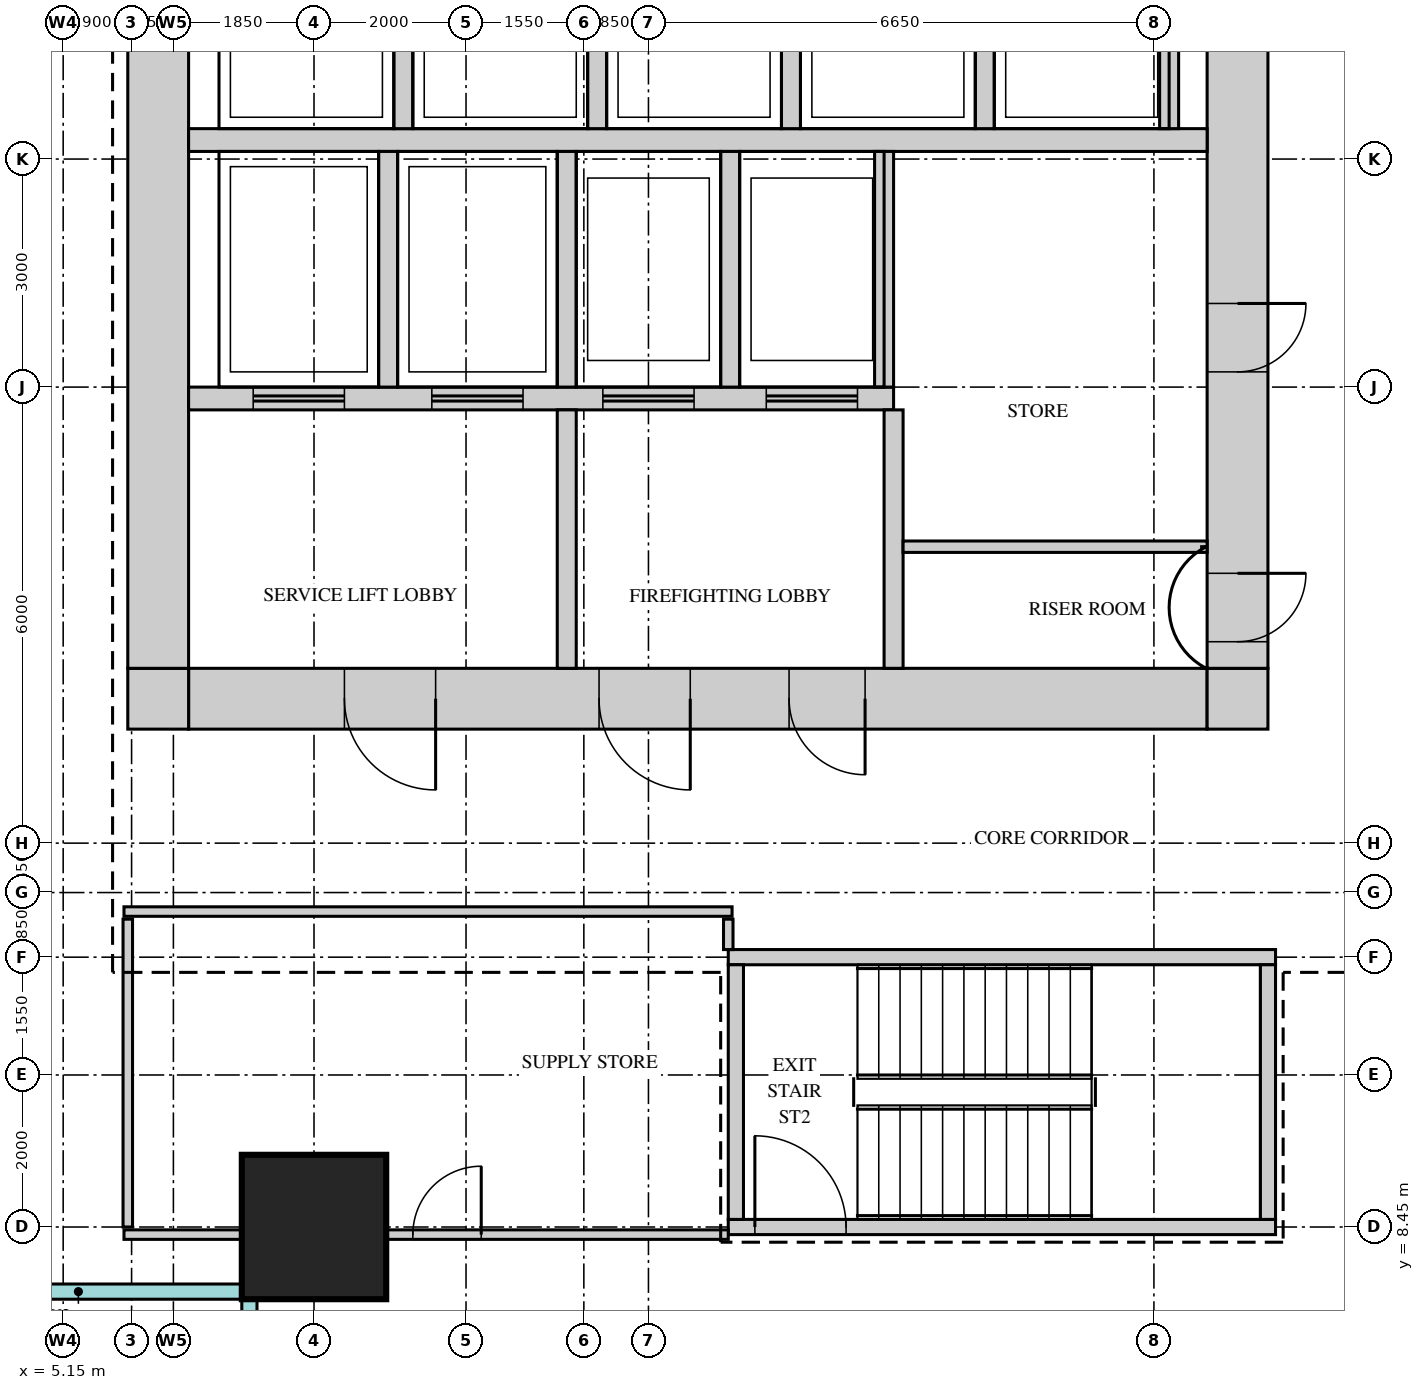
"""IFC4 building model, lengths in metres.
Left out: names, types, materials, properties, quantities, classifications, styles, units other than length and angle.
Written with IfcOpenShell. Run it as: python <this file> out.ifc"""

import sys

from ifc_helpers import new_model, si_unit, direction, frame, frame_2d, origin, origin_2d, place, context, subcontext, project, spatial, rectangle, extrude, source, transform, mapped, element, fill, save


model = new_model("IFC4")
c1 = context("Model", 3, precision=1e-05, world=origin(), true_north=direction((0.0, 1.0)))
c2 = subcontext(c1, "Body", "Model", "MODEL_VIEW")
j1 = project(units=[si_unit("LENGTHUNIT", "METRE"), si_unit("PLANEANGLEUNIT", "RADIAN")], contexts=[c1])
p1 = place(None, origin())
s1 = spatial("IfcSite", under=j1, at=p1, CompositionType="ELEMENT")
p2 = place(p1, origin())
s2 = spatial("IfcBuilding", under=s1, at=p2, CompositionType="ELEMENT")
p3 = place(p2, frame((0.0, 0.0, 208.7)))
s3 = spatial("IfcBuildingStorey", under=s2, at=p3, CompositionType="ELEMENT", Elevation=208.7)
m1 = source(origin(), c2, "Body", "SweptSolid", [
    extrude(rectangle(XDim=13.4, YDim=0.8, at=frame_2d((6.7, 0.0))), origin(), (0.0, 0.0, 1.0), 3.75),
])
p4 = place(p3, frame((6.8, 15.4, 0.0), z_axis=(0.0, 0.0, 1.0), x_axis=(1.0, 0.0, 0.0)))
e1 = element("IfcWall", 1, at=p4, inside=s3, PredefinedType="SHEAR", context=c2, shape_type="MappedRepresentation", body=[
    mapped(m1, transform((0.0, 0.0, 0.0))),
])
m2 = source(origin(), c2, "Body", "SweptSolid", [
    extrude(rectangle(XDim=1.2, YDim=2.1, at=frame_2d((0.6, 1.05))), frame((0.0, 0.41, 0.0), z_axis=(0.0, -1.0, 0.0), x_axis=(1.0, 0.0, 0.0)), (0.0, 0.0, 1.0), 0.82),
])
p5 = place(p4, frame((5.4, 0.0, 0.0)))
e2 = element("IfcOpeningElement", 2, at=p5, cuts=e1, PredefinedType="OPENING", context=c2, shape_type="MappedRepresentation", body=[
    mapped(m2, transform((0.0, 0.0, 0.0))),
])
p6 = place(p4, frame((2.05, 0.0, 0.0)))
e3 = element("IfcOpeningElement", 3, at=p6, cuts=e1, PredefinedType="OPENING", context=c2, shape_type="MappedRepresentation", body=[
    mapped(m2, transform((0.0, 0.0, 0.0))),
])
m3 = source(origin(), c2, "Body", "SweptSolid", [
    extrude(rectangle(XDim=1.0, YDim=2.1, at=frame_2d((0.5, 1.05))), frame((0.0, 0.41, 0.0), z_axis=(0.0, -1.0, 0.0), x_axis=(1.0, 0.0, 0.0)), (0.0, 0.0, 1.0), 0.82),
])
p7 = place(p4, frame((7.9, 0.0, 0.0)))
e4 = element("IfcOpeningElement", 4, at=p7, cuts=e1, PredefinedType="OPENING", context=c2, shape_type="MappedRepresentation", body=[
    mapped(m3, transform((0.0, 0.0, 0.0))),
])
m4 = source(origin(), c2, "Body", "SweptSolid", [
    extrude(rectangle(XDim=0.8, YDim=0.8, at=frame_2d((0.4, 0.0))), origin(), (0.0, 0.0, 1.0), 3.75),
])
for number, where, z_axis, x_axis in (
    (5, (20.2, 15.4, 0.0), (0.0, 0.0, 1.0), (1.0, 0.0, 0.0)),
    (6, (6.0, 15.4, 0.0), (0.0, 0.0, 1.0), (1.0, 0.0, 0.0)),
):
    element("IfcWall", number, at=place(p3, frame(where, z_axis=z_axis, x_axis=x_axis)), inside=s3, PredefinedType="SHEAR", context=c2, shape_type="MappedRepresentation", body=[
        mapped(m4, transform((0.0, 0.0, 0.0))),
    ])
m5 = source(origin(), c2, "Body", "SweptSolid", [
    extrude(rectangle(XDim=22.4, YDim=0.8, at=frame_2d((11.2, 0.0))), origin(), (0.0, 0.0, 1.0), 3.75),
])
p8 = place(p3, frame((20.6, 15.8, 0.0), z_axis=(0.0, 0.0, 1.0), x_axis=(0.0, 1.0, 0.0)))
e7 = element("IfcWall", 7, at=p8, inside=s3, PredefinedType="SHEAR", context=c2, shape_type="MappedRepresentation", body=[
    mapped(m5, transform((0.0, 0.0, 0.0))),
])
m6 = source(origin(), c2, "Body", "SweptSolid", [
    extrude(rectangle(XDim=1.8, YDim=2.1, at=frame_2d((0.9, 1.05))), frame((0.0, 0.41, 0.0), z_axis=(0.0, -1.0, 0.0), x_axis=(1.0, 0.0, 0.0)), (0.0, 0.0, 1.0), 0.82),
])
p9 = place(p8, frame((10.7, 0.0, 0.0)))
e8 = element("IfcOpeningElement", 8, at=p9, cuts=e7, PredefinedType="OPENING", context=c2, shape_type="MappedRepresentation", body=[
    mapped(m6, transform((0.0, 0.0, 0.0))),
])
m7 = source(origin(), c2, "Body", "SweptSolid", [
    extrude(rectangle(XDim=0.9, YDim=2.1, at=frame_2d((0.45, 1.05))), frame((0.0, 0.41, 0.0), z_axis=(0.0, -1.0, 0.0), x_axis=(1.0, 0.0, 0.0)), (0.0, 0.0, 1.0), 0.82),
])
p10 = place(p8, frame((0.35, 0.0, 0.0)))
e9 = element("IfcOpeningElement", 9, at=p10, cuts=e7, PredefinedType="OPENING", context=c2, shape_type="MappedRepresentation", body=[
    mapped(m7, transform((0.0, 0.0, 0.0))),
])
p11 = place(p8, frame((3.9, 0.0, 0.0)))
e10 = element("IfcOpeningElement", 10, at=p11, cuts=e7, PredefinedType="OPENING", context=c2, shape_type="MappedRepresentation", body=[
    mapped(m7, transform((0.0, 0.0, 0.0))),
])
p12 = place(p3, frame((6.4, 15.8, 0.0), z_axis=(0.0, 0.0, 1.0), x_axis=(0.0, 1.0, 0.0)))
e11 = element("IfcWall", 11, at=p12, inside=s3, PredefinedType="SHEAR", context=c2, shape_type="MappedRepresentation", body=[
    mapped(m5, transform((0.0, 0.0, 0.0))),
])
m8 = source(origin(), c2, "Body", "SweptSolid", [
    extrude(rectangle(XDim=7.2, YDim=0.2, at=frame_2d((3.6, 0.0))), origin(), (0.0, 0.0, 1.0), 3.75),
])
p13 = place(p3, frame((13.9, 12.0, 0.0), z_axis=(0.0, 0.0, 1.0), x_axis=(1.0, 0.0, 0.0)))
e12 = element("IfcWall", 12, at=p13, inside=s3, PredefinedType="SHEAR", context=c2, shape_type="MappedRepresentation", body=[
    mapped(m8, transform((0.0, 0.0, 0.0))),
])
p14 = place(p3, frame((13.9, 8.45, 0.0), z_axis=(0.0, 0.0, 1.0), x_axis=(1.0, 0.0, 0.0)))
e13 = element("IfcWall", 13, at=p14, inside=s3, PredefinedType="SHEAR", context=c2, shape_type="MappedRepresentation", body=[
    mapped(m8, transform((0.0, 0.0, 0.0))),
])
m9 = source(origin(), c2, "Body", "SweptSolid", [
    extrude(rectangle(XDim=1.2, YDim=2.1, at=frame_2d((0.6, 1.05))), frame((0.0, 0.11, 0.0), z_axis=(0.0, -1.0, 0.0), x_axis=(1.0, 0.0, 0.0)), (0.0, 0.0, 1.0), 0.22),
])
p15 = place(p14, frame((0.35, 0.0, 0.0)))
e14 = element("IfcOpeningElement", 14, at=p15, cuts=e13, PredefinedType="OPENING", context=c2, shape_type="MappedRepresentation", body=[
    mapped(m9, transform((0.0, 0.0, 0.0))),
])
m10 = source(origin(), c2, "Body", "SweptSolid", [
    extrude(rectangle(XDim=3.35, YDim=0.2, at=frame_2d((1.675, 0.0))), origin(), (0.0, 0.0, 1.0), 3.75),
])
for number, where, z_axis, x_axis in (
    (15, (21.0, 8.55, 0.0), (0.0, 0.0, 1.0), (0.0, 1.0, 0.0)),
    (16, (14.0, 8.55, 0.0), (0.0, 0.0, 1.0), (0.0, 1.0, 0.0)),
):
    element("IfcWall", number, at=place(p3, frame(where, z_axis=z_axis, x_axis=x_axis)), inside=s3, PredefinedType="SHEAR", context=c2, shape_type="MappedRepresentation", body=[
        mapped(m10, transform((0.0, 0.0, 0.0))),
    ])
m11 = source(origin(), c2, "Body", "SweptSolid", [
    extrude(rectangle(XDim=13.4, YDim=0.3, at=frame_2d((6.7, 0.0))), origin(), (0.0, 0.0, 1.0), 3.75),
])
p16 = place(p3, frame((6.8, 22.75, 0.0), z_axis=(0.0, 0.0, 1.0), x_axis=(1.0, 0.0, 0.0)))
e17 = element("IfcWall", 17, at=p16, inside=s3, PredefinedType="STANDARD", context=c2, shape_type="MappedRepresentation", body=[
    mapped(m11, transform((0.0, 0.0, 0.0))),
])
m12 = source(origin(), c2, "Body", "SweptSolid", [
    extrude(rectangle(XDim=9.275, YDim=0.3, at=frame_2d((4.637, 0.0))), origin(), (0.0, 0.0, 1.0), 3.75),
])
p17 = place(p3, frame((6.8, 19.35, 0.0), z_axis=(0.0, 0.0, 1.0), x_axis=(1.0, 0.0, 0.0)))
e18 = element("IfcWall", 18, at=p17, inside=s3, PredefinedType="STANDARD", context=c2, shape_type="MappedRepresentation", body=[
    mapped(m12, transform((0.0, 0.0, 0.0))),
])
m13 = source(origin(), c2, "Body", "SweptSolid", [
    extrude(rectangle(XDim=1.2, YDim=2.1, at=frame_2d((0.6, 1.05))), frame((0.0, 0.16, 0.0), z_axis=(0.0, -1.0, 0.0), x_axis=(1.0, 0.0, 0.0)), (0.0, 0.0, 1.0), 0.32),
])
p18 = place(p17, frame((0.85, 0.0, 0.0)))
e19 = element("IfcOpeningElement", 19, at=p18, cuts=e18, PredefinedType="OPENING", context=c2, shape_type="MappedRepresentation", body=[
    mapped(m13, transform((0.0, 0.0, 0.0))),
])
p19 = place(p17, frame((3.2, 0.0, 0.0)))
e20 = element("IfcOpeningElement", 20, at=p19, cuts=e18, PredefinedType="OPENING", context=c2, shape_type="MappedRepresentation", body=[
    mapped(m13, transform((0.0, 0.0, 0.0))),
])
p20 = place(p17, frame((5.45, 0.0, 0.0)))
e21 = element("IfcOpeningElement", 21, at=p20, cuts=e18, PredefinedType="OPENING", context=c2, shape_type="MappedRepresentation", body=[
    mapped(m13, transform((0.0, 0.0, 0.0))),
])
p21 = place(p17, frame((7.6, 0.0, 0.0)))
e22 = element("IfcOpeningElement", 22, at=p21, cuts=e18, PredefinedType="OPENING", context=c2, shape_type="MappedRepresentation", body=[
    mapped(m13, transform((0.0, 0.0, 0.0))),
])
m14 = source(origin(), c2, "Body", "SweptSolid", [
    extrude(rectangle(XDim=3.1, YDim=0.25, at=frame_2d((1.55, 0.0))), origin(), (0.0, 0.0, 1.0), 3.75),
])
for number, where, z_axis, x_axis in (
    (23, (9.425, 19.5, 0.0), (0.0, 0.0, 1.0), (0.0, 1.0, 0.0)),
    (24, (11.775, 19.5, 0.0), (0.0, 0.0, 1.0), (0.0, 1.0, 0.0)),
    (25, (13.925, 19.5, 0.0), (0.0, 0.0, 1.0), (0.0, 1.0, 0.0)),
    (26, (15.95, 19.5, 0.0), (0.0, 0.0, 1.0), (0.0, 1.0, 0.0)),
):
    element("IfcWall", number, at=place(p3, frame(where, z_axis=z_axis, x_axis=x_axis)), inside=s3, PredefinedType="STANDARD", context=c2, shape_type="MappedRepresentation", body=[
        mapped(m14, transform((0.0, 0.0, 0.0))),
    ])
m15 = source(origin(), c2, "Body", "SweptSolid", [
    extrude(rectangle(XDim=2.4, YDim=0.25, at=frame_2d((1.2, 0.0))), origin(), (0.0, 0.0, 1.0), 3.75),
])
for number, where, z_axis, x_axis in (
    (27, (17.275, 22.9, 0.0), (0.0, 0.0, 1.0), (0.0, 1.0, 0.0)),
    (28, (19.7, 22.9, 0.0), (0.0, 0.0, 1.0), (0.0, 1.0, 0.0)),
    (29, (9.625, 22.9, 0.0), (0.0, 0.0, 1.0), (0.0, 1.0, 0.0)),
    (30, (12.175, 22.9, 0.0), (0.0, 0.0, 1.0), (0.0, 1.0, 0.0)),
    (31, (14.725, 22.9, 0.0), (0.0, 0.0, 1.0), (0.0, 1.0, 0.0)),
):
    element("IfcWall", number, at=place(p3, frame(where, z_axis=z_axis, x_axis=x_axis)), inside=s3, PredefinedType="STANDARD", context=c2, shape_type="MappedRepresentation", body=[
        mapped(m15, transform((0.0, 0.0, 0.0))),
    ])
m16 = source(origin(), c2, "Body", "SweptSolid", [
    extrude(rectangle(XDim=3.4, YDim=0.25, at=frame_2d((1.7, 0.0))), origin(), (0.0, 0.0, 1.0), 3.75),
])
for number, where, z_axis, x_axis in (
    (32, (16.075, 15.8, 0.0), (0.0, 0.0, 1.0), (0.0, 1.0, 0.0)),
    (33, (11.775, 15.8, 0.0), (0.0, 0.0, 1.0), (0.0, 1.0, 0.0)),
):
    element("IfcWall", number, at=place(p3, frame(where, z_axis=z_axis, x_axis=x_axis)), inside=s3, PredefinedType="STANDARD", context=c2, shape_type="MappedRepresentation", body=[
        mapped(m16, transform((0.0, 0.0, 0.0))),
    ])
m17 = source(origin(), c2, "Body", "SweptSolid", [
    extrude(rectangle(XDim=1.9, YDim=1.9, at=origin_2d()), origin(), (0.0, 0.0, 1.0), 4.0),
])
p22 = place(p3, frame((8.45, 8.45, 0.0), z_axis=(0.0, 0.0, 1.0), x_axis=(1.0, 0.0, 0.0)))
e34 = element("IfcColumn", 34, at=p22, inside=s3, PredefinedType="COLUMN", context=c2, shape_type="MappedRepresentation", body=[
    mapped(m17, transform((0.0, 0.0, 0.0))),
])
m18 = source(origin(), c2, "Body", "SweptSolid", [
    extrude(rectangle(XDim=7.95, YDim=0.125, at=frame_2d((3.975, 0.0))), origin(), (0.0, 0.0, 1.0), 3.25),
])
p23 = place(p3, frame((5.95, 8.35, 0.0), z_axis=(0.0, 0.0, 1.0), x_axis=(1.0, 0.0, 0.0)))
e35 = element("IfcWall", 35, at=p23, inside=s3, PredefinedType="PARTITIONING", context=c2, shape_type="MappedRepresentation", body=[
    mapped(m18, transform((0.0, 0.0, 0.0))),
])
m19 = source(origin(), c2, "Body", "SweptSolid", [
    extrude(rectangle(XDim=0.9, YDim=2.1, at=frame_2d((0.45, 1.05))), frame((0.0, 0.073, 0.0), z_axis=(0.0, -1.0, 0.0), x_axis=(1.0, 0.0, 0.0)), (0.0, 0.0, 1.0), 0.145),
])
p24 = place(p23, frame((3.8, 0.0, 0.0)))
e36 = element("IfcOpeningElement", 36, at=p24, cuts=e35, PredefinedType="OPENING", context=c2, shape_type="MappedRepresentation", body=[
    mapped(m19, transform((0.0, 0.0, 0.0))),
])
m20 = source(origin(), c2, "Body", "SweptSolid", [
    extrude(rectangle(XDim=4.05, YDim=0.125, at=frame_2d((2.025, 0.0))), origin(), (0.0, 0.0, 1.0), 3.8),
])
p25 = place(p3, frame((6.0, 8.45, 0.0), z_axis=(0.0, 0.0, 1.0), x_axis=(0.0, 1.0, 0.0)))
e37 = element("IfcWall", 37, at=p25, inside=s3, PredefinedType="PARTITIONING", context=c2, shape_type="MappedRepresentation", body=[
    mapped(m20, transform((0.0, 0.0, 0.0))),
])
m21 = source(origin(), c2, "Body", "SweptSolid", [
    extrude(rectangle(XDim=0.4, YDim=0.125, at=frame_2d((0.2, 0.0))), origin(), (0.0, 0.0, 1.0), 3.8),
])
p26 = place(p3, frame((13.9, 12.1, 0.0), z_axis=(0.0, 0.0, 1.0), x_axis=(0.0, 1.0, 0.0)))
e38 = element("IfcWall", 38, at=p26, inside=s3, PredefinedType="PARTITIONING", context=c2, shape_type="MappedRepresentation", body=[
    mapped(m21, transform((0.0, 0.0, 0.0))),
])
m22 = source(origin(), c2, "Body", "SweptSolid", [
    extrude(rectangle(XDim=8.0, YDim=0.125, at=frame_2d((4.0, 0.0))), origin(), (0.0, 0.0, 1.0), 3.8),
])
p27 = place(p3, frame((5.95, 12.6, 0.0), z_axis=(0.0, 0.0, 1.0), x_axis=(1.0, 0.0, 0.0)))
e39 = element("IfcWall", 39, at=p27, inside=s3, PredefinedType="PARTITIONING", context=c2, shape_type="MappedRepresentation", body=[
    mapped(m22, transform((0.0, 0.0, 0.0))),
])
m23 = source(origin(), c2, "Body", "SweptSolid", [
    extrude(rectangle(XDim=4.0, YDim=0.15, at=frame_2d((2.0, 0.0))), origin(), (0.0, 0.0, 1.0), 3.8),
])
p28 = place(p3, frame((16.2, 17.4, 0.0), z_axis=(0.0, 0.0, 1.0), x_axis=(1.0, 0.0, 0.0)))
e40 = element("IfcWall", 40, at=p28, inside=s3, PredefinedType="PARTITIONING", context=c2, shape_type="MappedRepresentation", body=[
    mapped(m23, transform((0.0, 0.0, 0.0))),
])
m24 = source(origin(), c2, "Body", "SweptSolid", [
    extrude(rectangle(XDim=0.9, YDim=2.1, at=frame_2d((0.45, 1.05))), frame((0.0, 0.35, 0.0), z_axis=(0.0, -1.0, 0.0), x_axis=(1.0, 0.0, 0.0)), (0.0, 0.0, 1.0), 0.7),
])
p29 = place(p10, origin())
e41 = element("IfcDoor", 41, at=p29, inside=s3, OperationType="SINGLE_SWING_RIGHT", PredefinedType="DOOR", context=c2, shape_type="MappedRepresentation", body=[
    mapped(m24, transform((0.0, 0.0, 0.0))),
])
fill(e9, e41)
p30 = place(p11, origin())
e42 = element("IfcDoor", 42, at=p30, inside=s3, OperationType="SINGLE_SWING_RIGHT", PredefinedType="DOOR", context=c2, shape_type="MappedRepresentation", body=[
    mapped(m24, transform((0.0, 0.0, 0.0))),
])
fill(e10, e42)
m25 = source(origin(), c2, "Body", "SweptSolid", [
    extrude(rectangle(XDim=1.2, YDim=2.1, at=frame_2d((0.6, 1.05))), frame((0.0, 0.35, 0.0), z_axis=(0.0, -1.0, 0.0), x_axis=(1.0, 0.0, 0.0)), (0.0, 0.0, 1.0), 0.7),
])
p31 = place(p5, origin())
e43 = element("IfcDoor", 43, at=p31, inside=s3, OperationType="SINGLE_SWING_RIGHT", PredefinedType="DOOR", context=c2, shape_type="MappedRepresentation", body=[
    mapped(m25, transform((0.0, 0.0, 0.0))),
])
fill(e2, e43)
p32 = place(p6, origin())
e44 = element("IfcDoor", 44, at=p32, inside=s3, OperationType="SINGLE_SWING_RIGHT", PredefinedType="DOOR", context=c2, shape_type="MappedRepresentation", body=[
    mapped(m25, transform((0.0, 0.0, 0.0))),
])
fill(e3, e44)
m26 = source(origin(), c2, "Body", "SweptSolid", [
    extrude(rectangle(XDim=1.0, YDim=2.1, at=frame_2d((0.5, 1.05))), frame((0.0, 0.35, 0.0), z_axis=(0.0, -1.0, 0.0), x_axis=(1.0, 0.0, 0.0)), (0.0, 0.0, 1.0), 0.7),
])
p33 = place(p7, origin())
e45 = element("IfcDoor", 45, at=p33, inside=s3, OperationType="SINGLE_SWING_RIGHT", PredefinedType="DOOR", context=c2, shape_type="MappedRepresentation", body=[
    mapped(m26, transform((0.0, 0.0, 0.0))),
])
fill(e4, e45)
m27 = source(origin(), c2, "Body", "SweptSolid", [
    extrude(rectangle(XDim=0.9, YDim=2.1, at=frame_2d((0.45, 1.05))), frame((0.0, 0.025, 0.0), z_axis=(0.0, -1.0, 0.0), x_axis=(1.0, 0.0, 0.0)), (0.0, 0.0, 1.0), 0.05),
])
p34 = place(p24, origin())
e46 = element("IfcDoor", 46, at=p34, inside=s3, OperationType="SINGLE_SWING_LEFT", PredefinedType="DOOR", context=c2, shape_type="MappedRepresentation", body=[
    mapped(m27, transform((0.0, 0.0, 0.0))),
])
fill(e36, e46)
m28 = source(origin(), c2, "Body", "SweptSolid", [
    extrude(rectangle(XDim=1.2, YDim=2.1, at=frame_2d((0.6, 1.05))), frame((0.0, 0.025, 0.0), z_axis=(0.0, -1.0, 0.0), x_axis=(1.0, 0.0, 0.0)), (0.0, 0.0, 1.0), 0.05),
])
p35 = place(p15, origin())
e47 = element("IfcDoor", 47, at=p35, inside=s3, OperationType="SINGLE_SWING_RIGHT", PredefinedType="DOOR", context=c2, shape_type="MappedRepresentation", body=[
    mapped(m28, transform((0.0, 0.0, 0.0))),
])
fill(e14, e47)
p36 = place(p18, origin())
e48 = element("IfcDoor", 48, at=p36, inside=s3, OperationType="DOUBLE_DOOR_SLIDING", PredefinedType="DOOR", context=c2, shape_type="MappedRepresentation", body=[
    mapped(m28, transform((0.0, 0.0, 0.0))),
])
fill(e19, e48)
p37 = place(p19, origin())
e49 = element("IfcDoor", 49, at=p37, inside=s3, OperationType="DOUBLE_DOOR_SLIDING", PredefinedType="DOOR", context=c2, shape_type="MappedRepresentation", body=[
    mapped(m28, transform((0.0, 0.0, 0.0))),
])
fill(e20, e49)
p38 = place(p20, origin())
e50 = element("IfcDoor", 50, at=p38, inside=s3, OperationType="DOUBLE_DOOR_SLIDING", PredefinedType="DOOR", context=c2, shape_type="MappedRepresentation", body=[
    mapped(m28, transform((0.0, 0.0, 0.0))),
])
fill(e21, e50)
p39 = place(p21, origin())
e51 = element("IfcDoor", 51, at=p39, inside=s3, OperationType="DOUBLE_DOOR_SLIDING", PredefinedType="DOOR", context=c2, shape_type="MappedRepresentation", body=[
    mapped(m28, transform((0.0, 0.0, 0.0))),
])
fill(e22, e51)
save(model, sys.argv[1])
